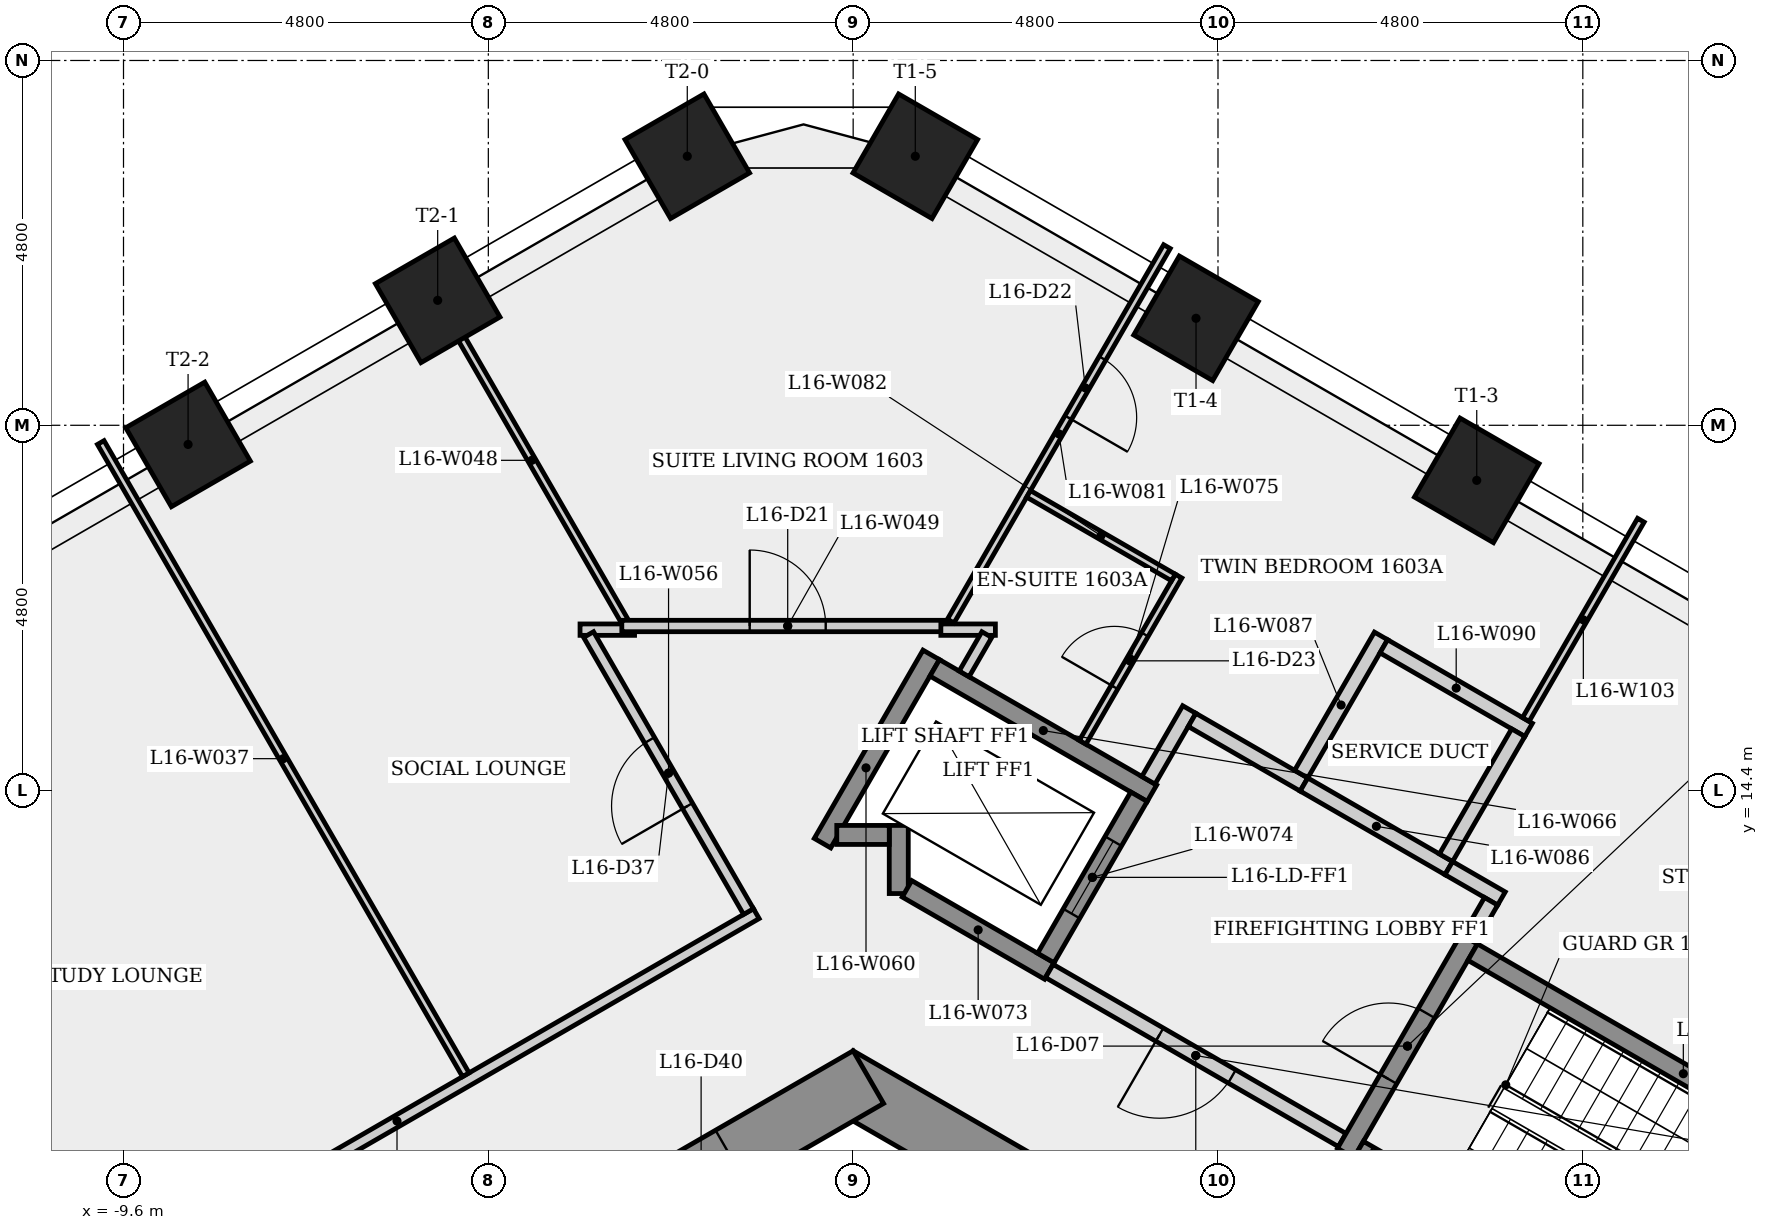
"""IFC4 building model, lengths in metres.
Left out: names, types, materials, properties, quantities, classifications, styles, units other than length and angle.
Written with IfcOpenShell. Run it as: python <this file> out.ifc"""

import sys

from ifc_helpers import new_model, si_unit, direction, frame, frame_2d, origin, origin_2d, place, context, subcontext, project, spatial, rectangle, extrude, element, fill, save


model = new_model("IFC4")
c1 = context("Model", 3, precision=1e-05, world=origin(), true_north=direction((0.0, 1.0)))
c2 = subcontext(c1, "Body", "Model", "MODEL_VIEW")
j1 = project(units=[si_unit("LENGTHUNIT", "METRE"), si_unit("PLANEANGLEUNIT", "RADIAN")], contexts=[c1])
p1 = place(None, origin())
s1 = spatial("IfcSite", under=j1, at=p1, CompositionType="ELEMENT")
p2 = place(p1, origin())
s2 = spatial("IfcBuilding", under=s1, at=p2, CompositionType="ELEMENT")
p3 = place(p2, frame((0.0, 0.0, 62.9)))
s3 = spatial("IfcBuildingStorey", under=s2, at=p3, CompositionType="ELEMENT", Elevation=62.9)
p4 = place(p3, frame((9.3, 5.138, 0.0), z_axis=(0.0, 0.0, 1.0), x_axis=(-0.866023993627, 0.500002442456, 0.0)))
e1 = element("IfcWall", 1, at=p4, inside=s3, PredefinedType="SHEAR", context=c2, shape_type="SweptSolid", body=[
    extrude(rectangle(XDim=10.97, YDim=0.8, at=frame_2d((5.485, 0.0))), origin(), (0.0, 0.0, 1.0), 3.4),
])
p5 = place(p4, frame((2.962, 0.0, 0.0)))
e2 = element("IfcOpeningElement", 2, at=p5, cuts=e1, PredefinedType="OPENING", context=c2, shape_type="SweptSolid", body=[
    extrude(rectangle(XDim=0.9, YDim=2.1, at=frame_2d((0.45, 1.05))), frame((0.0, 0.41, 0.0), z_axis=(0.0, -1.0, 0.0), x_axis=(1.0, 0.0, 0.0)), (0.0, 0.0, 1.0), 0.82),
])
p6 = place(p3, frame((0.2, 10.623, 0.0), z_axis=(0.0, 0.0, 1.0), x_axis=(-0.866023993627, -0.500002442456, 0.0)))
e3 = element("IfcWall", 3, at=p6, inside=s3, PredefinedType="SHEAR", context=c2, shape_type="SweptSolid", body=[
    extrude(rectangle(XDim=10.97, YDim=0.8, at=frame_2d((5.485, 0.0))), origin(), (0.0, 0.0, 1.0), 3.4),
])
p7 = place(p6, frame((9.325, 0.0, 0.0)))
e4 = element("IfcOpeningElement", 4, at=p7, cuts=e3, PredefinedType="OPENING", context=c2, shape_type="SweptSolid", body=[
    extrude(rectangle(XDim=0.9, YDim=2.1, at=frame_2d((0.45, 1.05))), frame((0.0, 0.41, 0.0), z_axis=(0.0, -1.0, 0.0), x_axis=(1.0, 0.0, 0.0)), (0.0, 0.0, 1.0), 0.82),
])
p8 = place(p6, frame((2.091, 0.0, 0.0)))
e5 = element("IfcOpeningElement", 5, at=p8, cuts=e3, PredefinedType="OPENING", context=c2, shape_type="SweptSolid", body=[
    extrude(rectangle(XDim=0.9, YDim=2.1, at=frame_2d((0.45, 1.05))), frame((0.0, 0.41, 0.0), z_axis=(0.0, -1.0, 0.0), x_axis=(1.0, 0.0, 0.0)), (0.0, 0.0, 1.0), 0.82),
])
for number, where, z_axis, x_axis in (
    (6, (8.204, 18.475, 0.0), (0.0, 0.0, 1.0), (0.5, 0.866, 0.0)),
    (7, (4.511, 20.607, 0.0), (0.0, 0.0, 1.0), (0.5, 0.866, 0.0)),
    (8, (0.818, 22.74, 0.0), (0.0, 0.0, 1.0), (0.5, 0.866, 0.0)),
    (9, (-2.182, 22.74, 0.0), (0.0, 0.0, 1.0), (-0.5, 0.866, 0.0)),
    (10, (-5.466, 20.844, 0.0), (0.0, 0.0, 1.0), (-0.5, 0.866, 0.0)),
    (11, (-8.75, 18.948, 0.0), (0.0, 0.0, 1.0), (-0.5, 0.866, 0.0)),
):
    element("IfcColumn", number, at=place(p3, frame(where, z_axis=z_axis, x_axis=x_axis)), inside=s3, PredefinedType="COLUMN", context=c2, shape_type="SweptSolid", body=[
        extrude(rectangle(XDim=1.2, YDim=1.2, at=origin_2d()), origin(), (0.0, 0.0, 1.0), 3.4),
    ])
p9 = place(p3, frame((-10.729, 7.316, 0.0), z_axis=(0.0, 0.0, 1.0), x_axis=(0.86603401421, 0.499985086009, 0.0)))
e12 = element("IfcWall", 12, at=p9, inside=s3, PredefinedType="PARTITIONING", context=c2, shape_type="SweptSolid", body=[
    extrude(rectangle(XDim=10.917, YDim=0.15, at=frame_2d((5.458, 0.0))), origin(), (0.0, 0.0, 1.0), 3.0),
])
p10 = place(p3, frame((-5.096, 10.654, 0.0), z_axis=(0.0, 0.0, 1.0), x_axis=(-0.500006994331, 0.866021365568, 0.0)))
e13 = element("IfcWall", 13, at=p10, inside=s3, PredefinedType="PARTITIONING", context=c2, shape_type="SweptSolid", body=[
    extrude(rectangle(XDim=9.606, YDim=0.1, at=frame_2d((4.803, 0.0))), origin(), (0.0, 0.0, 1.0), 3.0),
])
p11 = place(p3, frame((-3.594, 16.511, 0.0), z_axis=(0.0, 0.0, 1.0), x_axis=(1.0, 0.0, 0.0)))
e14 = element("IfcWall", 14, at=p11, inside=s3, PredefinedType="PARTITIONING", context=c2, shape_type="SweptSolid", body=[
    extrude(rectangle(XDim=0.718, YDim=0.15, at=frame_2d((0.359, 0.0))), origin(), (0.0, 0.0, 1.0), 3.0),
])
p12 = place(p3, frame((-3.006, 16.624, 0.0), z_axis=(0.0, 0.0, 1.0), x_axis=(-0.499950314103, 0.86605408805, 0.0)))
e15 = element("IfcWall", 15, at=p12, inside=s3, PredefinedType="PARTITIONING", context=c2, shape_type="SweptSolid", body=[
    extrude(rectangle(XDim=4.885, YDim=0.1, at=frame_2d((2.442, 0.0))), origin(), (0.0, 0.0, 1.0), 3.0),
])
p13 = place(p3, frame((-3.044, 16.559, 0.0), z_axis=(0.0, 0.0, 1.0), x_axis=(1.0, 0.0, 0.0)))
e16 = element("IfcWall", 16, at=p13, inside=s3, PredefinedType="PARTITIONING", context=c2, shape_type="SweptSolid", body=[
    extrude(rectangle(XDim=4.365, YDim=0.15, at=frame_2d((2.183, 0.0))), origin(), (0.0, 0.0, 1.0), 3.0),
])
p14 = place(p13, frame((1.683, 0.0, 0.0)))
e17 = element("IfcOpeningElement", 17, at=p14, cuts=e16, PredefinedType="OPENING", context=c2, shape_type="SweptSolid", body=[
    extrude(rectangle(XDim=1.0, YDim=2.1, at=frame_2d((0.5, 1.05))), frame((0.0, 0.085, 0.0), z_axis=(0.0, -1.0, 0.0), x_axis=(1.0, 0.0, 0.0)), (0.0, 0.0, 1.0), 0.17),
])
p15 = place(p3, frame((-1.377, 12.802, 0.0), z_axis=(0.0, 0.0, 1.0), x_axis=(-0.500038835258, 0.866002981077, 0.0)))
e18 = element("IfcWall", 18, at=p15, inside=s3, PredefinedType="PARTITIONING", context=c2, shape_type="SweptSolid", body=[
    extrude(rectangle(XDim=4.208, YDim=0.15, at=frame_2d((2.104, 0.0))), origin(), (0.0, 0.0, 1.0), 3.0),
])
p16 = place(p15, frame((1.604, 0.0, 0.0)))
e19 = element("IfcOpeningElement", 19, at=p16, cuts=e18, PredefinedType="OPENING", context=c2, shape_type="SweptSolid", body=[
    extrude(rectangle(XDim=1.0, YDim=2.1, at=frame_2d((0.5, 1.05))), frame((0.0, 0.085, 0.0), z_axis=(0.0, -1.0, 0.0), x_axis=(1.0, 0.0, 0.0)), (0.0, 0.0, 1.0), 0.17),
])
p17 = place(p3, frame((-0.403, 13.702, 0.0), z_axis=(0.0, 0.0, 1.0), x_axis=(0.499976111731, 0.866039195244, 0.0)))
e20 = element("IfcWall", 20, at=p17, inside=s3, PredefinedType="SHEAR", context=c2, shape_type="SweptSolid", body=[
    extrude(rectangle(XDim=2.861, YDim=0.25, at=frame_2d((1.43, 0.0))), origin(), (0.0, 0.0, 1.0), 3.0),
])
p18 = place(p3, frame((0.6, 13.039, 0.0), z_axis=(0.0, 0.0, 1.0), x_axis=(0.0, 1.0, 0.0)))
e21 = element("IfcWall", 21, at=p18, inside=s3, PredefinedType="SHEAR", context=c2, shape_type="SweptSolid", body=[
    extrude(rectangle(XDim=0.896, YDim=0.25, at=frame_2d((0.448, 0.0))), origin(), (0.0, 0.0, 1.0), 3.0),
])
p19 = place(p3, frame((0.475, 13.81, 0.0), z_axis=(0.0, 0.0, 1.0), x_axis=(-1.0, 0.0, 0.0)))
e22 = element("IfcWall", 22, at=p19, inside=s3, PredefinedType="SHEAR", context=c2, shape_type="SweptSolid", body=[
    extrude(rectangle(XDim=0.691, YDim=0.25, at=frame_2d((0.345, 0.0))), origin(), (0.0, 0.0, 1.0), 3.4),
])
p20 = place(p3, frame((1.073, 16.008, 0.0), z_axis=(0.0, 0.0, 1.0), x_axis=(0.866040211805, -0.499974350878, 0.0)))
e23 = element("IfcWall", 23, at=p20, inside=s3, PredefinedType="SHEAR", context=c2, shape_type="SweptSolid", body=[
    extrude(rectangle(XDim=3.3, YDim=0.25, at=frame_2d((1.65, 0.0))), origin(), (0.0, 0.0, 1.0), 3.0),
])
p21 = place(p3, frame((1.154, 16.511, 0.0), z_axis=(0.0, 0.0, 1.0), x_axis=(1.0, 0.0, 0.0)))
e24 = element("IfcWall", 24, at=p21, inside=s3, PredefinedType="PARTITIONING", context=c2, shape_type="SweptSolid", body=[
    extrude(rectangle(XDim=0.717, YDim=0.15, at=frame_2d((0.359, 0.0))), origin(), (0.0, 0.0, 1.0), 3.0),
])
p22 = place(p3, frame((1.759, 16.446, 0.0), z_axis=(0.0, 0.0, 1.0), x_axis=(-0.499746055734, -0.86617196894, 0.0)))
e25 = element("IfcWall", 25, at=p22, inside=s3, PredefinedType="PARTITIONING", context=c2, shape_type="SweptSolid", body=[
    extrude(rectangle(XDim=0.597, YDim=0.15, at=frame_2d((0.298, 0.0))), origin(), (0.0, 0.0, 1.0), 3.0),
])
p23 = place(p3, frame((2.581, 12.02, 0.0), z_axis=(0.0, 0.0, 1.0), x_axis=(-0.86603892542, 0.499976579108, 0.0)))
e26 = element("IfcWall", 26, at=p23, inside=s3, PredefinedType="SHEAR", context=c2, shape_type="SweptSolid", body=[
    extrude(rectangle(XDim=2.162, YDim=0.25, at=frame_2d((1.081, 0.0))), origin(), (0.0, 0.0, 1.0), 3.0),
])
p24 = place(p3, frame((2.535, 12.191, 0.0), z_axis=(0.0, 0.0, 1.0), x_axis=(0.500061746146, 0.865989751695, 0.0)))
e27 = element("IfcWall", 27, at=p24, inside=s3, PredefinedType="SHEAR", context=c2, shape_type="SweptSolid", body=[
    extrude(rectangle(XDim=2.45, YDim=0.25, at=frame_2d((1.225, 0.0))), origin(), (0.0, 0.0, 1.0), 3.4),
])
p25 = place(p24, frame((0.675, 0.0, 0.0)))
e28 = element("IfcOpeningElement", 28, at=p25, cuts=e27, PredefinedType="OPENING", context=c2, shape_type="SweptSolid", body=[
    extrude(rectangle(XDim=1.1, YDim=2.1, at=frame_2d((0.55, 1.05))), frame((0.0, 0.135, 0.0), z_axis=(0.0, -1.0, 0.0), x_axis=(1.0, 0.0, 0.0)), (0.0, 0.0, 1.0), 0.27),
])
p26 = place(p3, frame((3.019, 15.029, 0.0), z_axis=(0.0, 0.0, 1.0), x_axis=(0.499976333282, 0.866039067339, 0.0)))
e29 = element("IfcWall", 29, at=p26, inside=s3, PredefinedType="PARTITIONING", context=c2, shape_type="SweptSolid", body=[
    extrude(rectangle(XDim=2.525, YDim=0.1, at=frame_2d((1.262, 0.0))), origin(), (0.0, 0.0, 1.0), 3.0),
])
p27 = place(p26, frame((0.837, 0.0, 0.0)))
e30 = element("IfcOpeningElement", 30, at=p27, cuts=e29, PredefinedType="OPENING", context=c2, shape_type="SweptSolid", body=[
    extrude(rectangle(XDim=0.8, YDim=2.1, at=frame_2d((0.4, 1.05))), frame((0.0, 0.06, 0.0), z_axis=(0.0, -1.0, 0.0), x_axis=(1.0, 0.0, 0.0)), (0.0, 0.0, 1.0), 0.12),
])
p28 = place(p3, frame((3.885, 14.529, 0.0), z_axis=(0.0, 0.0, 1.0), x_axis=(0.499997628298, 0.866026773083, 0.0)))
e31 = element("IfcWall", 31, at=p28, inside=s3, PredefinedType="PARTITIONING", context=c2, shape_type="SweptSolid", body=[
    extrude(rectangle(XDim=1.075, YDim=0.2, at=frame_2d((0.538, 0.0))), origin(), (0.0, 0.0, 1.0), 3.0),
])
p29 = place(p3, frame((4.128, 21.551, 0.0), z_axis=(0.0, 0.0, 1.0), x_axis=(-0.499983721286, -0.8660348021, 0.0)))
e32 = element("IfcWall", 32, at=p29, inside=s3, PredefinedType="PARTITIONING", context=c2, shape_type="SweptSolid", body=[
    extrude(rectangle(XDim=5.689, YDim=0.1, at=frame_2d((2.845, 0.0))), origin(), (0.0, 0.0, 1.0), 3.0),
])
p30 = place(p29, frame((1.697, 0.0, 0.0)))
e33 = element("IfcOpeningElement", 33, at=p30, cuts=e32, PredefinedType="OPENING", context=c2, shape_type="SweptSolid", body=[
    extrude(rectangle(XDim=0.9, YDim=2.1, at=frame_2d((0.45, 1.05))), frame((0.0, 0.06, 0.0), z_axis=(0.0, -1.0, 0.0), x_axis=(1.0, 0.0, 0.0)), (0.0, 0.0, 1.0), 0.12),
])
p31 = place(p3, frame((4.213, 17.198, 0.0), z_axis=(0.0, 0.0, 1.0), x_axis=(-0.86605622881, 0.499946605688, 0.0)))
e34 = element("IfcWall", 34, at=p31, inside=s3, PredefinedType="PARTITIONING", context=c2, shape_type="SweptSolid", body=[
    extrude(rectangle(XDim=2.2, YDim=0.1, at=frame_2d((1.1, 0.0))), origin(), (0.0, 0.0, 1.0), 3.0),
])
p32 = place(p3, frame((4.459, 15.323, 0.0), z_axis=(0.0, 0.0, 1.0), x_axis=(0.866025371046, -0.500000056704, 0.0)))
e35 = element("IfcWall", 35, at=p32, inside=s3, PredefinedType="PARTITIONING", context=c2, shape_type="SweptSolid", body=[
    extrude(rectangle(XDim=1.7, YDim=0.2, at=frame_2d((0.85, 0.0))), origin(), (0.0, 0.0, 1.0), 3.0),
])
p33 = place(p3, frame((5.931, 14.473, 0.0), z_axis=(0.0, 0.0, 1.0), x_axis=(0.866008176907, -0.50002983664, 0.0)))
e36 = element("IfcWall", 36, at=p33, inside=s3, PredefinedType="PLUMBINGWALL", context=c2, shape_type="SweptSolid", body=[
    extrude(rectangle(XDim=2.2, YDim=0.2, at=frame_2d((1.1, 0.0))), origin(), (0.0, 0.0, 1.0), 3.0),
])
p34 = place(p3, frame((5.895, 14.61, 0.0), z_axis=(0.0, 0.0, 1.0), x_axis=(0.49994051562, 0.866059744384, 0.0)))
e37 = element("IfcWall", 37, at=p34, inside=s3, PredefinedType="PLUMBINGWALL", context=c2, shape_type="SweptSolid", body=[
    extrude(rectangle(XDim=2.1, YDim=0.2, at=frame_2d((1.05, 0.0))), origin(), (0.0, 0.0, 1.0), 3.0),
])
p35 = place(p3, frame((6.435, 9.795, 0.0), z_axis=(0.0, 0.0, 1.0), x_axis=(-0.866012907634, 0.500021643343, 0.0)))
e38 = element("IfcWall", 38, at=p35, inside=s3, PredefinedType="PARTITIONING", context=c2, shape_type="SweptSolid", body=[
    extrude(rectangle(XDim=4.45, YDim=0.2, at=frame_2d((2.225, 0.0))), origin(), (0.0, 0.0, 1.0), 3.0),
])
p36 = place(p35, frame((1.675, 0.0, 0.0)))
e39 = element("IfcOpeningElement", 39, at=p36, cuts=e38, PredefinedType="OPENING", context=c2, shape_type="SweptSolid", body=[
    extrude(rectangle(XDim=1.1, YDim=2.1, at=frame_2d((0.55, 1.05))), frame((0.0, 0.11, 0.0), z_axis=(0.0, -1.0, 0.0), x_axis=(1.0, 0.0, 0.0)), (0.0, 0.0, 1.0), 0.22),
])
p37 = place(p3, frame((6.48, 9.624, 0.0), z_axis=(0.0, 0.0, 1.0), x_axis=(0.500017246033, 0.866015446554, 0.0)))
e40 = element("IfcWall", 40, at=p37, inside=s3, PredefinedType="SHEAR", context=c2, shape_type="SweptSolid", body=[
    extrude(rectangle(XDim=3.25, YDim=0.25, at=frame_2d((1.625, 0.0))), origin(), (0.0, 0.0, 1.0), 3.0),
])
p38 = place(p37, frame((1.125, 0.0, 0.0)))
e41 = element("IfcOpeningElement", 41, at=p38, cuts=e40, PredefinedType="OPENING", context=c2, shape_type="SweptSolid", body=[
    extrude(rectangle(XDim=1.0, YDim=2.1, at=frame_2d((0.5, 1.05))), frame((0.0, 0.135, 0.0), z_axis=(0.0, -1.0, 0.0), x_axis=(1.0, 0.0, 0.0)), (0.0, 0.0, 1.0), 0.27),
])
p39 = place(p3, frame((6.981, 16.292, 0.0), z_axis=(0.0, 0.0, 1.0), x_axis=(0.866035918664, -0.499981787252, 0.0)))
e42 = element("IfcWall", 42, at=p39, inside=s3, PredefinedType="PLUMBINGWALL", context=c2, shape_type="SweptSolid", body=[
    extrude(rectangle(XDim=2.2, YDim=0.2, at=frame_2d((1.1, 0.0))), origin(), (0.0, 0.0, 1.0), 3.0),
])
p40 = place(p3, frame((7.836, 13.373, 0.0), z_axis=(0.0, 0.0, 1.0), x_axis=(0.866094119867, -0.499880961361, 0.0)))
e43 = element("IfcWall", 43, at=p40, inside=s3, PredefinedType="PARTITIONING", context=c2, shape_type="SweptSolid", body=[
    extrude(rectangle(XDim=0.8, YDim=0.2, at=frame_2d((0.4, 0.0))), origin(), (0.0, 0.0, 1.0), 3.0),
])
p41 = place(p3, frame((8.151, 12.268, 0.0), z_axis=(0.0, 0.0, 1.0), x_axis=(0.866025499775, -0.499999833739, 0.0)))
e44 = element("IfcWall", 44, at=p41, inside=s3, PredefinedType="SHEAR", context=c2, shape_type="SweptSolid", body=[
    extrude(rectangle(XDim=6.4, YDim=0.25, at=frame_2d((3.2, 0.0))), origin(), (0.0, 0.0, 1.0), 3.0),
])
p42 = place(p3, frame((8.393, 12.937, 0.0), z_axis=(0.0, 0.0, 1.0), x_axis=(-0.500065409566, -0.86598763626, 0.0)))
e45 = element("IfcWall", 45, at=p42, inside=s3, PredefinedType="PARTITIONING", context=c2, shape_type="SweptSolid", body=[
    extrude(rectangle(XDim=0.575, YDim=0.2, at=frame_2d((0.288, 0.0))), origin(), (0.0, 0.0, 1.0), 3.0),
])
p43 = place(p3, frame((8.85, 15.329, 0.0), z_axis=(0.0, 0.0, 1.0), x_axis=(0.500015609314, 0.866016391555, 0.0)))
e46 = element("IfcWall", 46, at=p43, inside=s3, PredefinedType="PARTITIONING", context=c2, shape_type="SweptSolid", body=[
    extrude(rectangle(XDim=3.028, YDim=0.1, at=frame_2d((1.514, 0.0))), origin(), (0.0, 0.0, 1.0), 3.0),
])
p44 = place(p3, frame((8.75, 15.156, 0.0), z_axis=(0.0, 0.0, 1.0), x_axis=(-0.499967155389, -0.866044365799, 0.0)))
e47 = element("IfcWall", 47, at=p44, inside=s3, PredefinedType="PLUMBINGWALL", context=c2, shape_type="SweptSolid", body=[
    extrude(rectangle(XDim=1.9, YDim=0.2, at=frame_2d((0.95, 0.0))), origin(), (0.0, 0.0, 1.0), 3.0),
])
p45 = place(p3, frame((12.194, 6.47, 0.0), z_axis=(0.0, 0.0, 1.0), x_axis=(-0.866025499775, 0.499999833739, 0.0)))
e48 = element("IfcWall", 48, at=p45, inside=s3, PredefinedType="SHEAR", context=c2, shape_type="SweptSolid", body=[
    extrude(rectangle(XDim=6.4, YDim=0.25, at=frame_2d((3.2, 0.0))), origin(), (0.0, 0.0, 1.0), 3.0),
])
p46 = place(p45, frame((5.25, 0.0, 0.0)))
e49 = element("IfcOpeningElement", 49, at=p46, cuts=e48, PredefinedType="OPENING", context=c2, shape_type="SweptSolid", body=[
    extrude(rectangle(XDim=1.0, YDim=2.1, at=frame_2d((0.5, 1.05))), frame((0.0, 0.135, 0.0), z_axis=(0.0, -1.0, 0.0), x_axis=(1.0, 0.0, 0.0)), (0.0, 0.0, 1.0), 0.27),
])
p47 = place(p38, origin())
e50 = element("IfcDoor", 50, at=p47, inside=s3, OperationType="SINGLE_SWING_LEFT", PredefinedType="DOOR", context=c2, shape_type="SweptSolid", body=[
    extrude(rectangle(XDim=1.0, YDim=2.1, at=frame_2d((0.5, 1.05))), frame((0.0, 0.025, 0.0), z_axis=(0.0, -1.0, 0.0), x_axis=(1.0, 0.0, 0.0)), (0.0, 0.0, 1.0), 0.05),
])
fill(e41, e50)
p48 = place(p36, origin())
e51 = element("IfcDoor", 51, at=p48, inside=s3, OperationType="SINGLE_SWING_RIGHT", PredefinedType="DOOR", context=c2, shape_type="SweptSolid", body=[
    extrude(rectangle(XDim=1.1, YDim=2.1, at=frame_2d((0.55, 1.05))), frame((0.0, 0.025, 0.0), z_axis=(0.0, -1.0, 0.0), x_axis=(1.0, 0.0, 0.0)), (0.0, 0.0, 1.0), 0.05),
])
fill(e39, e51)
p49 = place(p25, origin())
e52 = element("IfcDoor", 52, at=p49, inside=s3, OperationType="SLIDING_TO_LEFT", PredefinedType="DOOR", context=c2, shape_type="SweptSolid", body=[
    extrude(rectangle(XDim=1.1, YDim=2.1, at=frame_2d((0.55, 1.05))), frame((0.0, 0.025, 0.0), z_axis=(0.0, -1.0, 0.0), x_axis=(1.0, 0.0, 0.0)), (0.0, 0.0, 1.0), 0.05),
])
fill(e28, e52)
p50 = place(p14, origin())
e53 = element("IfcDoor", 53, at=p50, inside=s3, OperationType="SINGLE_SWING_LEFT", PredefinedType="DOOR", context=c2, shape_type="SweptSolid", body=[
    extrude(rectangle(XDim=1.0, YDim=2.1, at=frame_2d((0.5, 1.05))), frame((0.0, 0.025, 0.0), z_axis=(0.0, -1.0, 0.0), x_axis=(1.0, 0.0, 0.0)), (0.0, 0.0, 1.0), 0.05),
])
fill(e17, e53)
p51 = place(p30, origin())
e54 = element("IfcDoor", 54, at=p51, inside=s3, OperationType="SINGLE_SWING_RIGHT", PredefinedType="DOOR", context=c2, shape_type="SweptSolid", body=[
    extrude(rectangle(XDim=0.9, YDim=2.1, at=frame_2d((0.45, 1.05))), frame((0.0, 0.025, 0.0), z_axis=(0.0, -1.0, 0.0), x_axis=(1.0, 0.0, 0.0)), (0.0, 0.0, 1.0), 0.05),
])
fill(e33, e54)
p52 = place(p27, origin())
e55 = element("IfcDoor", 55, at=p52, inside=s3, OperationType="SINGLE_SWING_LEFT", PredefinedType="DOOR", context=c2, shape_type="SweptSolid", body=[
    extrude(rectangle(XDim=0.8, YDim=2.1, at=frame_2d((0.4, 1.05))), frame((0.0, 0.025, 0.0), z_axis=(0.0, -1.0, 0.0), x_axis=(1.0, 0.0, 0.0)), (0.0, 0.0, 1.0), 0.05),
])
fill(e30, e55)
p53 = place(p16, origin())
e56 = element("IfcDoor", 56, at=p53, inside=s3, OperationType="SINGLE_SWING_LEFT", PredefinedType="DOOR", context=c2, shape_type="SweptSolid", body=[
    extrude(rectangle(XDim=1.0, YDim=2.1, at=frame_2d((0.5, 1.05))), frame((0.0, 0.025, 0.0), z_axis=(0.0, -1.0, 0.0), x_axis=(1.0, 0.0, 0.0)), (0.0, 0.0, 1.0), 0.05),
])
fill(e19, e56)
save(model, sys.argv[1])
